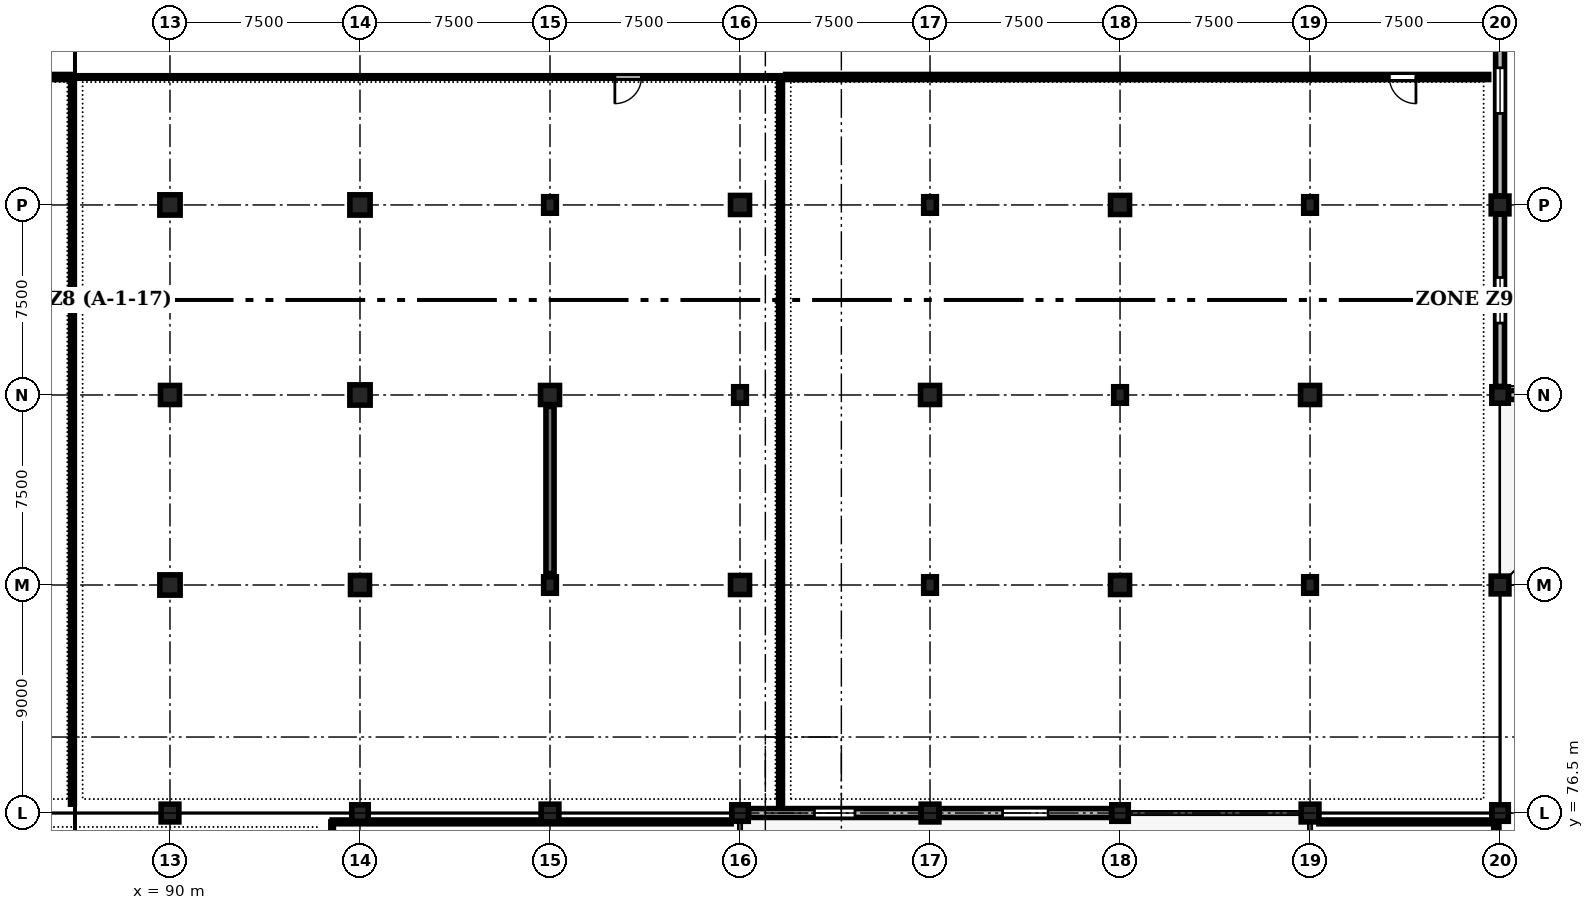
"""IFC4 building model, lengths in metres.
Left out: names, types, materials, properties, quantities, classifications, styles, units other than length and angle.
Written with IfcOpenShell. Run it as: python <this file> out.ifc"""

import sys

from ifc_helpers import new_model, si_unit, direction, frame, frame_2d, origin, origin_2d, place, context, subcontext, project, spatial, rectangle, circle, extrude, element, fill, save


model = new_model("IFC4")
c1 = context("Model", 3, precision=1e-05, world=origin(), true_north=direction((0.0, 1.0)))
c2 = subcontext(c1, "Body", "Model", "MODEL_VIEW")
j1 = project(units=[si_unit("LENGTHUNIT", "METRE"), si_unit("PLANEANGLEUNIT", "RADIAN")], contexts=[c1])
p1 = place(None, origin())
s1 = spatial("IfcSite", under=j1, at=p1, CompositionType="ELEMENT")
p2 = place(p1, origin())
s2 = spatial("IfcBuilding", under=s1, at=p2, CompositionType="ELEMENT")
p3 = place(p2, origin())
s3 = spatial("IfcBuildingStorey", under=s2, at=p3, CompositionType="ELEMENT", Elevation=0.0)
p4 = place(p3, frame((90.0, 76.5, 0.0), z_axis=(0.0, 0.0, 1.0), x_axis=(1.0, 0.0, 0.0)))
e1 = element("IfcColumn", 1, at=p4, inside=s3, PredefinedType="COLUMN", context=c2, shape_type="SweptSolid", body=[
    extrude(rectangle(XDim=0.7, YDim=0.7, at=origin_2d()), origin(), (0.0, 0.0, 1.0), 4.8),
])
p5 = place(p3, frame((90.0, 85.5, 0.0), z_axis=(0.0, 0.0, 1.0), x_axis=(1.0, 0.0, 0.0)))
e2 = element("IfcColumn", 2, at=p5, inside=s3, PredefinedType="COLUMN", context=c2, shape_type="SweptSolid", body=[
    extrude(rectangle(XDim=0.8, YDim=0.8, at=origin_2d()), origin(), (0.0, 0.0, 1.0), 4.8),
])
p6 = place(p3, frame((90.0, 93.0, 0.0), z_axis=(0.0, 0.0, 1.0), x_axis=(1.0, 0.0, 0.0)))
e3 = element("IfcColumn", 3, at=p6, inside=s3, PredefinedType="COLUMN", context=c2, shape_type="SweptSolid", body=[
    extrude(circle(Radius=0.375, at=origin_2d()), origin(), (0.0, 0.0, 1.0), 4.8),
])
p7 = place(p3, frame((90.0, 100.5, 0.0), z_axis=(0.0, 0.0, 1.0), x_axis=(1.0, 0.0, 0.0)))
e4 = element("IfcColumn", 4, at=p7, inside=s3, PredefinedType="COLUMN", context=c2, shape_type="SweptSolid", body=[
    extrude(rectangle(XDim=0.8, YDim=0.8, at=origin_2d()), origin(), (0.0, 0.0, 1.0), 4.8),
])
p8 = place(p3, frame((97.5, 76.5, 0.0), z_axis=(0.0, 0.0, 1.0), x_axis=(1.0, 0.0, 0.0)))
e5 = element("IfcColumn", 5, at=p8, inside=s3, PredefinedType="COLUMN", context=c2, shape_type="SweptSolid", body=[
    extrude(rectangle(XDim=0.65, YDim=0.65, at=origin_2d()), origin(), (0.0, 0.0, 1.0), 4.8),
])
p9 = place(p3, frame((97.5, 85.5, 0.0), z_axis=(0.0, 0.0, 1.0), x_axis=(1.0, 0.0, 0.0)))
e6 = element("IfcColumn", 6, at=p9, inside=s3, PredefinedType="COLUMN", context=c2, shape_type="SweptSolid", body=[
    extrude(circle(Radius=0.375, at=origin_2d()), origin(), (0.0, 0.0, 1.0), 4.8),
])
for number, where, z_axis, x_axis in (
    (7, (97.5, 93.0, 0.0), (0.0, 0.0, 1.0), (1.0, 0.0, 0.0)),
    (8, (97.5, 100.5, 0.0), (0.0, 0.0, 1.0), (1.0, 0.0, 0.0)),
):
    element("IfcColumn", number, at=place(p3, frame(where, z_axis=z_axis, x_axis=x_axis)), inside=s3, PredefinedType="COLUMN", context=c2, shape_type="SweptSolid", body=[
        extrude(rectangle(XDim=0.8, YDim=0.8, at=origin_2d()), origin(), (0.0, 0.0, 1.0), 4.8),
    ])
p10 = place(p3, frame((105.0, 76.5, 0.0), z_axis=(0.0, 0.0, 1.0), x_axis=(1.0, 0.0, 0.0)))
e9 = element("IfcColumn", 9, at=p10, inside=s3, PredefinedType="COLUMN", context=c2, shape_type="SweptSolid", body=[
    extrude(rectangle(XDim=0.7, YDim=0.7, at=origin_2d()), origin(), (0.0, 0.0, 1.0), 4.8),
])
p11 = place(p3, frame((105.0, 85.5, 0.0), z_axis=(0.0, 0.0, 1.0), x_axis=(1.0, 0.0, 0.0)))
e10 = element("IfcColumn", 10, at=p11, inside=s3, PredefinedType="COLUMN", context=c2, shape_type="SweptSolid", body=[
    extrude(rectangle(XDim=0.5, YDim=0.65, at=origin_2d()), origin(), (0.0, 0.0, 1.0), 4.8),
])
p12 = place(p3, frame((105.0, 93.0, 0.0), z_axis=(0.0, 0.0, 1.0), x_axis=(1.0, 0.0, 0.0)))
e11 = element("IfcColumn", 11, at=p12, inside=s3, PredefinedType="COLUMN", context=c2, shape_type="SweptSolid", body=[
    extrude(rectangle(XDim=0.75, YDim=0.75, at=origin_2d()), origin(), (0.0, 0.0, 1.0), 4.8),
])
p13 = place(p3, frame((105.0, 100.5, 0.0), z_axis=(0.0, 0.0, 1.0), x_axis=(1.0, 0.0, 0.0)))
e12 = element("IfcColumn", 12, at=p13, inside=s3, PredefinedType="COLUMN", context=c2, shape_type="SweptSolid", body=[
    extrude(rectangle(XDim=0.5, YDim=0.65, at=origin_2d()), origin(), (0.0, 0.0, 1.0), 4.8),
])
p14 = place(p3, frame((112.5, 76.5, 0.0), z_axis=(0.0, 0.0, 1.0), x_axis=(1.0, 0.0, 0.0)))
e13 = element("IfcColumn", 13, at=p14, inside=s3, PredefinedType="COLUMN", context=c2, shape_type="SweptSolid", body=[
    extrude(rectangle(XDim=0.65, YDim=0.65, at=origin_2d()), origin(), (0.0, 0.0, 1.0), 4.8),
])
p15 = place(p3, frame((112.5, 85.5, 0.0), z_axis=(0.0, 0.0, 1.0), x_axis=(1.0, 0.0, 0.0)))
e14 = element("IfcColumn", 14, at=p15, inside=s3, PredefinedType="COLUMN", context=c2, shape_type="SweptSolid", body=[
    extrude(rectangle(XDim=0.75, YDim=0.75, at=origin_2d()), origin(), (0.0, 0.0, 1.0), 4.8),
])
p16 = place(p3, frame((112.5, 93.0, 0.0), z_axis=(0.0, 0.0, 1.0), x_axis=(1.0, 0.0, 0.0)))
e15 = element("IfcColumn", 15, at=p16, inside=s3, PredefinedType="COLUMN", context=c2, shape_type="SweptSolid", body=[
    extrude(rectangle(XDim=0.5, YDim=0.65, at=origin_2d()), origin(), (0.0, 0.0, 1.0), 4.8),
])
p17 = place(p3, frame((112.5, 100.5, 0.0), z_axis=(0.0, 0.0, 1.0), x_axis=(1.0, 0.0, 0.0)))
e16 = element("IfcColumn", 16, at=p17, inside=s3, PredefinedType="COLUMN", context=c2, shape_type="SweptSolid", body=[
    extrude(rectangle(XDim=0.75, YDim=0.75, at=origin_2d()), origin(), (0.0, 0.0, 1.0), 4.8),
])
p18 = place(p3, frame((120.0, 76.5, 0.0), z_axis=(0.0, 0.0, 1.0), x_axis=(1.0, 0.0, 0.0)))
e17 = element("IfcColumn", 17, at=p18, inside=s3, PredefinedType="COLUMN", context=c2, shape_type="SweptSolid", body=[
    extrude(rectangle(XDim=0.7, YDim=0.7, at=origin_2d()), origin(), (0.0, 0.0, 1.0), 4.8),
])
p19 = place(p3, frame((120.0, 85.5, 0.0), z_axis=(0.0, 0.0, 1.0), x_axis=(1.0, 0.0, 0.0)))
e18 = element("IfcColumn", 18, at=p19, inside=s3, PredefinedType="COLUMN", context=c2, shape_type="SweptSolid", body=[
    extrude(rectangle(XDim=0.5, YDim=0.65, at=origin_2d()), origin(), (0.0, 0.0, 1.0), 4.8),
])
p20 = place(p3, frame((120.0, 93.0, 0.0), z_axis=(0.0, 0.0, 1.0), x_axis=(1.0, 0.0, 0.0)))
e19 = element("IfcColumn", 19, at=p20, inside=s3, PredefinedType="COLUMN", context=c2, shape_type="SweptSolid", body=[
    extrude(rectangle(XDim=0.75, YDim=0.75, at=origin_2d()), origin(), (0.0, 0.0, 1.0), 4.8),
])
p21 = place(p3, frame((120.0, 100.5, 0.0), z_axis=(0.0, 0.0, 1.0), x_axis=(1.0, 0.0, 0.0)))
e20 = element("IfcColumn", 20, at=p21, inside=s3, PredefinedType="COLUMN", context=c2, shape_type="SweptSolid", body=[
    extrude(rectangle(XDim=0.5, YDim=0.65, at=origin_2d()), origin(), (0.0, 0.0, 1.0), 4.8),
])
p22 = place(p3, frame((127.5, 76.5, 0.0), z_axis=(0.0, 0.0, 1.0), x_axis=(1.0, 0.0, 0.0)))
e21 = element("IfcColumn", 21, at=p22, inside=s3, PredefinedType="COLUMN", context=c2, shape_type="SweptSolid", body=[
    extrude(rectangle(XDim=0.65, YDim=0.65, at=origin_2d()), origin(), (0.0, 0.0, 1.0), 4.8),
])
p23 = place(p3, frame((127.5, 85.5, 0.0), z_axis=(0.0, 0.0, 1.0), x_axis=(1.0, 0.0, 0.0)))
e22 = element("IfcColumn", 22, at=p23, inside=s3, PredefinedType="COLUMN", context=c2, shape_type="SweptSolid", body=[
    extrude(rectangle(XDim=0.75, YDim=0.75, at=origin_2d()), origin(), (0.0, 0.0, 1.0), 4.8),
])
p24 = place(p3, frame((127.5, 93.0, 0.0), z_axis=(0.0, 0.0, 1.0), x_axis=(1.0, 0.0, 0.0)))
e23 = element("IfcColumn", 23, at=p24, inside=s3, PredefinedType="COLUMN", context=c2, shape_type="SweptSolid", body=[
    extrude(rectangle(XDim=0.5, YDim=0.65, at=origin_2d()), origin(), (0.0, 0.0, 1.0), 4.8),
])
p25 = place(p3, frame((127.5, 100.5, 0.0), z_axis=(0.0, 0.0, 1.0), x_axis=(1.0, 0.0, 0.0)))
e24 = element("IfcColumn", 24, at=p25, inside=s3, PredefinedType="COLUMN", context=c2, shape_type="SweptSolid", body=[
    extrude(rectangle(XDim=0.75, YDim=0.75, at=origin_2d()), origin(), (0.0, 0.0, 1.0), 4.8),
])
p26 = place(p3, frame((135.0, 76.5, 0.0), z_axis=(0.0, 0.0, 1.0), x_axis=(1.0, 0.0, 0.0)))
e25 = element("IfcColumn", 25, at=p26, inside=s3, PredefinedType="COLUMN", context=c2, shape_type="SweptSolid", body=[
    extrude(rectangle(XDim=0.7, YDim=0.7, at=origin_2d()), origin(), (0.0, 0.0, 1.0), 4.8),
])
p27 = place(p3, frame((135.0, 85.5, 0.0), z_axis=(0.0, 0.0, 1.0), x_axis=(1.0, 0.0, 0.0)))
e26 = element("IfcColumn", 26, at=p27, inside=s3, PredefinedType="COLUMN", context=c2, shape_type="SweptSolid", body=[
    extrude(rectangle(XDim=0.5, YDim=0.65, at=origin_2d()), origin(), (0.0, 0.0, 1.0), 4.8),
])
p28 = place(p3, frame((135.0, 93.0, 0.0), z_axis=(0.0, 0.0, 1.0), x_axis=(1.0, 0.0, 0.0)))
e27 = element("IfcColumn", 27, at=p28, inside=s3, PredefinedType="COLUMN", context=c2, shape_type="SweptSolid", body=[
    extrude(rectangle(XDim=0.75, YDim=0.75, at=origin_2d()), origin(), (0.0, 0.0, 1.0), 4.8),
])
p29 = place(p3, frame((135.0, 100.5, 0.0), z_axis=(0.0, 0.0, 1.0), x_axis=(1.0, 0.0, 0.0)))
e28 = element("IfcColumn", 28, at=p29, inside=s3, PredefinedType="COLUMN", context=c2, shape_type="SweptSolid", body=[
    extrude(rectangle(XDim=0.5, YDim=0.65, at=origin_2d()), origin(), (0.0, 0.0, 1.0), 4.8),
])
p30 = place(p3, frame((142.5, 76.5, 0.0), z_axis=(0.0, 0.0, 1.0), x_axis=(1.0, 0.0, 0.0)))
e29 = element("IfcColumn", 29, at=p30, inside=s3, PredefinedType="COLUMN", context=c2, shape_type="SweptSolid", body=[
    extrude(rectangle(XDim=0.65, YDim=0.65, at=origin_2d()), origin(), (0.0, 0.0, 1.0), 4.8),
])
p31 = place(p3, frame((142.5, 85.5, 0.0), z_axis=(0.0, 0.0, 1.0), x_axis=(1.0, 0.0, 0.0)))
e30 = element("IfcColumn", 30, at=p31, inside=s3, PredefinedType="COLUMN", context=c2, shape_type="SweptSolid", body=[
    extrude(rectangle(XDim=0.7, YDim=0.7, at=origin_2d()), origin(), (0.0, 0.0, 1.0), 4.8),
])
p32 = place(p3, frame((142.5, 93.0, 0.0), z_axis=(0.0, 0.0, 1.0), x_axis=(1.0, 0.0, 0.0)))
e31 = element("IfcColumn", 31, at=p32, inside=s3, PredefinedType="COLUMN", context=c2, shape_type="SweptSolid", body=[
    extrude(rectangle(XDim=0.65, YDim=0.65, at=origin_2d()), origin(), (0.0, 0.0, 1.0), 4.8),
])
p33 = place(p3, frame((142.5, 100.5, 0.0), z_axis=(0.0, 0.0, 1.0), x_axis=(1.0, 0.0, 0.0)))
e32 = element("IfcColumn", 32, at=p33, inside=s3, PredefinedType="COLUMN", context=c2, shape_type="SweptSolid", body=[
    extrude(rectangle(XDim=0.7, YDim=0.7, at=origin_2d()), origin(), (0.0, 0.0, 1.0), 4.8),
])
p34 = place(p3, frame((105.0, 85.95, 0.0), z_axis=(0.0, 0.0, 1.0), x_axis=(0.0, 1.0, 0.0)))
e33 = element("IfcWall", 33, at=p34, inside=s3, PredefinedType="SHEAR", context=c2, shape_type="SweptSolid", body=[
    extrude(rectangle(XDim=6.6, YDim=0.32, at=frame_2d((3.3, 0.0))), origin(), (0.0, 0.0, 1.0), 3.95),
])
p35 = place(p3, frame((119.64, 76.5, 0.0), z_axis=(0.0, 0.0, 1.0), x_axis=(-1.0, 0.0, 0.0)))
e34 = element("IfcWall", 34, at=p35, inside=s3, PredefinedType="STANDARD", context=c2, shape_type="SweptSolid", body=[
    extrude(rectangle(XDim=6.805, YDim=0.35, at=frame_2d((3.402, 0.0))), origin(), (0.0, 0.0, 1.0), 3.95),
])
p36 = place(p35, frame((2.603, 0.0, 0.9)))
e35 = element("IfcOpeningElement", 35, at=p36, cuts=e34, PredefinedType="OPENING", context=c2, shape_type="SweptSolid", body=[
    extrude(rectangle(XDim=1.6, YDim=1.95, at=frame_2d((0.8, 0.975))), frame((0.0, 0.185, 0.0), z_axis=(0.0, -1.0, 0.0), x_axis=(1.0, 0.0, 0.0)), (0.0, 0.0, 1.0), 0.37),
])
p37 = place(p3, frame((127.165, 76.5, 0.0), z_axis=(0.0, 0.0, 1.0), x_axis=(-1.0, 0.0, 0.0)))
e36 = element("IfcWall", 36, at=p37, inside=s3, PredefinedType="STANDARD", context=c2, shape_type="SweptSolid", body=[
    extrude(rectangle(XDim=6.805, YDim=0.35, at=frame_2d((3.402, 0.0))), origin(), (0.0, 0.0, 1.0), 3.95),
])
p38 = place(p37, frame((2.502, 0.0, 0.9)))
e37 = element("IfcOpeningElement", 37, at=p38, cuts=e36, PredefinedType="OPENING", context=c2, shape_type="SweptSolid", body=[
    extrude(rectangle(XDim=1.8, YDim=1.95, at=frame_2d((0.9, 0.975))), frame((0.0, 0.185, 0.0), z_axis=(0.0, -1.0, 0.0), x_axis=(1.0, 0.0, 0.0)), (0.0, 0.0, 1.0), 0.37),
])
p39 = place(p3, frame((142.5, 100.14, 0.0), z_axis=(0.0, 0.0, 1.0), x_axis=(0.0, -1.0, 0.0)))
e38 = element("IfcWall", 38, at=p39, inside=s3, PredefinedType="STANDARD", context=c2, shape_type="SweptSolid", body=[
    extrude(rectangle(XDim=6.805, YDim=0.35, at=frame_2d((3.402, 0.0))), origin(), (0.0, 0.0, 1.0), 3.9),
])
p40 = place(p39, frame((2.502, 0.0, 0.9)))
e39 = element("IfcOpeningElement", 39, at=p40, cuts=e38, PredefinedType="OPENING", context=c2, shape_type="SweptSolid", body=[
    extrude(rectangle(XDim=1.8, YDim=1.8, at=frame_2d((0.9, 0.9))), frame((0.0, 0.185, 0.0), z_axis=(0.0, -1.0, 0.0), x_axis=(1.0, 0.0, 0.0)), (0.0, 0.0, 1.0), 0.37),
])
p41 = place(p3, frame((142.5, 109.165, 0.0), z_axis=(0.0, 0.0, 1.0), x_axis=(0.0, -1.0, 0.0)))
e40 = element("IfcWall", 40, at=p41, inside=s3, PredefinedType="STANDARD", context=c2, shape_type="SweptSolid", body=[
    extrude(rectangle(XDim=8.305, YDim=0.35, at=frame_2d((4.152, 0.0))), origin(), (0.0, 0.0, 1.0), 3.95),
])
p42 = place(p41, frame((3.252, 0.0, 0.9)))
e41 = element("IfcOpeningElement", 41, at=p42, cuts=e40, PredefinedType="OPENING", context=c2, shape_type="SweptSolid", body=[
    extrude(rectangle(XDim=1.8, YDim=2.4, at=frame_2d((0.9, 1.2))), frame((0.0, 0.185, 0.0), z_axis=(0.0, -1.0, 0.0), x_axis=(1.0, 0.0, 0.0)), (0.0, 0.0, 1.0), 0.37),
])
p43 = place(p3, frame((142.835, 93.0, 0.0), z_axis=(0.0, 0.0, 1.0), x_axis=(1.0, 0.0, 0.0)))
e42 = element("IfcWall", 42, at=p43, inside=s3, PredefinedType="STANDARD", context=c2, shape_type="SweptSolid", body=[
    extrude(rectangle(XDim=6.93, YDim=0.35, at=frame_2d((3.465, 0.0))), origin(), (0.0, 0.0, 1.0), 4.5),
])
p44 = place(p43, frame((2.565, 0.0, 0.9)))
e43 = element("IfcOpeningElement", 43, at=p44, cuts=e42, PredefinedType="OPENING", context=c2, shape_type="SweptSolid", body=[
    extrude(rectangle(XDim=1.8, YDim=1.8, at=frame_2d((0.9, 0.9))), frame((0.0, 0.185, 0.0), z_axis=(0.0, -1.0, 0.0), x_axis=(1.0, 0.0, 0.0)), (0.0, 0.0, 1.0), 0.37),
])
p45 = place(p3, frame((96.4, 76.15, 0.0), z_axis=(0.0, 0.0, 1.0), x_axis=(0.0, -1.0, 0.0)))
e44 = element("IfcWall", 44, at=p45, inside=s3, PredefinedType="PARTITIONING", context=c2, shape_type="SweptSolid", body=[
    extrude(rectangle(XDim=14.65, YDim=0.1, at=frame_2d((7.325, 0.0))), origin(), (0.0, 0.0, 1.0), 4.485),
])
p46 = place(p45, frame((2.87, 0.0, 0.0)))
e45 = element("IfcOpeningElement", 45, at=p46, cuts=e44, PredefinedType="OPENING", context=c2, shape_type="SweptSolid", body=[
    extrude(rectangle(XDim=1.05, YDim=2.2, at=frame_2d((0.525, 1.1))), frame((0.0, 0.06, 0.0), z_axis=(0.0, -1.0, 0.0), x_axis=(1.0, 0.0, 0.0)), (0.0, 0.0, 1.0), 0.12),
])
p47 = place(p3, frame((142.3, 31.5, 0.0), z_axis=(0.0, 0.0, 1.0), x_axis=(0.0, 1.0, 0.0)))
e46 = element("IfcWall", 46, at=p47, inside=s3, PredefinedType="PARTITIONING", context=c2, shape_type="SweptSolid", body=[
    extrude(rectangle(XDim=44.65, YDim=0.1, at=frame_2d((22.325, 0.0))), origin(), (0.0, 0.0, 1.0), 3.935),
])
p48 = place(p47, frame((26.11, 0.0, 0.0)))
e47 = element("IfcOpeningElement", 47, at=p48, cuts=e46, PredefinedType="OPENING", context=c2, shape_type="SweptSolid", body=[
    extrude(rectangle(XDim=1.05, YDim=2.2, at=frame_2d((0.525, 1.1))), frame((0.0, 0.06, 0.0), z_axis=(0.0, -1.0, 0.0), x_axis=(1.0, 0.0, 0.0)), (0.0, 0.0, 1.0), 0.12),
])
p49 = place(p3, frame((86.15, 105.55, 0.0), z_axis=(0.0, 0.0, 1.0), x_axis=(-1.0, 0.0, 0.0)))
e48 = element("IfcWall", 48, at=p49, inside=s3, PredefinedType="STANDARD", context=c2, shape_type="SweptSolid", body=[
    extrude(rectangle(XDim=27.75, YDim=0.2, at=frame_2d((13.875, 0.0))), origin(), (0.0, 0.0, 1.0), 4.485),
])
p50 = place(p49, frame((21.21, 0.0, 0.0)))
e49 = element("IfcOpeningElement", 49, at=p50, cuts=e48, PredefinedType="OPENING", context=c2, shape_type="SweptSolid", body=[
    extrude(rectangle(XDim=1.05, YDim=2.2, at=frame_2d((0.525, 1.1))), frame((0.0, 0.11, 0.0), z_axis=(0.0, -1.0, 0.0), x_axis=(1.0, 0.0, 0.0)), (0.0, 0.0, 1.0), 0.22),
])
p51 = place(p3, frame((114.1, 105.55, 0.0), z_axis=(0.0, 0.0, 1.0), x_axis=(-1.0, 0.0, 0.0)))
e50 = element("IfcWall", 50, at=p51, inside=s3, PredefinedType="PARTITIONING", context=c2, shape_type="SweptSolid", body=[
    extrude(rectangle(XDim=27.75, YDim=0.1, at=frame_2d((13.875, 0.0))), origin(), (0.0, 0.0, 1.0), 4.485),
])
p52 = place(p51, frame((5.49, 0.0, 0.0)))
e51 = element("IfcOpeningElement", 51, at=p52, cuts=e50, PredefinedType="OPENING", context=c2, shape_type="SweptSolid", body=[
    extrude(rectangle(XDim=1.05, YDim=2.2, at=frame_2d((0.525, 1.1))), frame((0.0, 0.06, 0.0), z_axis=(0.0, -1.0, 0.0), x_axis=(1.0, 0.0, 0.0)), (0.0, 0.0, 1.0), 0.12),
])
p53 = place(p3, frame((142.05, 105.55, 0.0), z_axis=(0.0, 0.0, 1.0), x_axis=(-1.0, 0.0, 0.0)))
e52 = element("IfcWall", 52, at=p53, inside=s3, PredefinedType="STANDARD", context=c2, shape_type="SweptSolid", body=[
    extrude(rectangle(XDim=27.75, YDim=0.2, at=frame_2d((13.875, 0.0))), origin(), (0.0, 0.0, 1.0), 4.485),
])
p54 = place(p53, frame((2.87, 0.0, 0.0)))
e53 = element("IfcOpeningElement", 53, at=p54, cuts=e52, PredefinedType="OPENING", context=c2, shape_type="SweptSolid", body=[
    extrude(rectangle(XDim=1.05, YDim=2.2, at=frame_2d((0.525, 1.1))), frame((0.0, 0.11, 0.0), z_axis=(0.0, -1.0, 0.0), x_axis=(1.0, 0.0, 0.0)), (0.0, 0.0, 1.0), 0.22),
])
p55 = place(p3, frame((96.4, 76.15, 0.0), z_axis=(0.0, 0.0, 1.0), x_axis=(1.0, 0.0, 0.0)))
e54 = element("IfcWall", 54, at=p55, inside=s3, PredefinedType="PARTITIONING", context=c2, shape_type="SweptSolid", body=[
    extrude(rectangle(XDim=15.75, YDim=0.15, at=frame_2d((7.875, 0.0))), origin(), (0.0, 0.0, 1.0), 3.835),
])
p56 = place(p3, frame((135.35, 76.15, 0.0), z_axis=(0.0, 0.0, 1.0), x_axis=(1.0, 0.0, 0.0)))
e55 = element("IfcWall", 55, at=p56, inside=s3, PredefinedType="PARTITIONING", context=c2, shape_type="SweptSolid", body=[
    extrude(rectangle(XDim=6.95, YDim=0.15, at=frame_2d((3.475, 0.0))), origin(), (0.0, 0.0, 1.0), 3.835),
])
p57 = place(p3, frame((86.15, 76.85, 0.0), z_axis=(0.0, 0.0, 1.0), x_axis=(0.0, 1.0, 0.0)))
e56 = element("IfcWall", 56, at=p57, inside=s3, PredefinedType="PARTITIONING", context=c2, shape_type="SweptSolid", body=[
    extrude(rectangle(XDim=28.7, YDim=0.15, at=frame_2d((14.35, 0.0))), origin(), (0.0, 0.0, 1.0), 4.085),
])
p58 = place(p3, frame((114.1, 76.85, 0.0), z_axis=(0.0, 0.0, 1.0), x_axis=(0.0, 1.0, 0.0)))
e57 = element("IfcWall", 57, at=p58, inside=s3, PredefinedType="PARTITIONING", context=c2, shape_type="SweptSolid", body=[
    extrude(rectangle(XDim=28.7, YDim=0.15, at=frame_2d((14.35, 0.0))), origin(), (0.0, 0.0, 1.0), 4.485),
])
p59 = place(p36, origin())
e58 = element("IfcWindow", 58, at=p59, inside=s3, PartitioningType="SINGLE_PANEL", PredefinedType="WINDOW", context=c2, shape_type="SweptSolid", body=[
    extrude(rectangle(XDim=1.6, YDim=1.95, at=frame_2d((0.8, 0.975))), frame((0.0, 0.03, 0.0), z_axis=(0.0, -1.0, 0.0), x_axis=(1.0, 0.0, 0.0)), (0.0, 0.0, 1.0), 0.06),
])
fill(e35, e58)
p60 = place(p38, origin())
e59 = element("IfcWindow", 59, at=p60, inside=s3, PartitioningType="SINGLE_PANEL", PredefinedType="WINDOW", context=c2, shape_type="SweptSolid", body=[
    extrude(rectangle(XDim=1.8, YDim=1.95, at=frame_2d((0.9, 0.975))), frame((0.0, 0.03, 0.0), z_axis=(0.0, -1.0, 0.0), x_axis=(1.0, 0.0, 0.0)), (0.0, 0.0, 1.0), 0.06),
])
fill(e37, e59)
p61 = place(p40, origin())
e60 = element("IfcWindow", 60, at=p61, inside=s3, PartitioningType="SINGLE_PANEL", PredefinedType="WINDOW", context=c2, shape_type="SweptSolid", body=[
    extrude(rectangle(XDim=1.8, YDim=1.8, at=frame_2d((0.9, 0.9))), frame((0.0, 0.03, 0.0), z_axis=(0.0, -1.0, 0.0), x_axis=(1.0, 0.0, 0.0)), (0.0, 0.0, 1.0), 0.06),
])
fill(e39, e60)
p62 = place(p42, origin())
e61 = element("IfcWindow", 61, at=p62, inside=s3, PartitioningType="SINGLE_PANEL", PredefinedType="WINDOW", context=c2, shape_type="SweptSolid", body=[
    extrude(rectangle(XDim=1.8, YDim=2.4, at=frame_2d((0.9, 1.2))), frame((0.0, 0.03, 0.0), z_axis=(0.0, -1.0, 0.0), x_axis=(1.0, 0.0, 0.0)), (0.0, 0.0, 1.0), 0.06),
])
fill(e41, e61)
p63 = place(p52, origin())
e62 = element("IfcDoor", 62, at=p63, inside=s3, OperationType="SINGLE_SWING_RIGHT", PredefinedType="DOOR", context=c2, shape_type="SweptSolid", body=[
    extrude(rectangle(XDim=1.05, YDim=2.2, at=frame_2d((0.525, 1.1))), frame((0.0, 0.025, 0.0), z_axis=(0.0, -1.0, 0.0), x_axis=(1.0, 0.0, 0.0)), (0.0, 0.0, 1.0), 0.05),
])
fill(e51, e62)
p64 = place(p54, origin())
e63 = element("IfcDoor", 63, at=p64, inside=s3, OperationType="SINGLE_SWING_LEFT", PredefinedType="DOOR", context=c2, shape_type="SweptSolid", body=[
    extrude(rectangle(XDim=1.05, YDim=2.2, at=frame_2d((0.525, 1.1))), frame((0.0, 0.025, 0.0), z_axis=(0.0, -1.0, 0.0), x_axis=(1.0, 0.0, 0.0)), (0.0, 0.0, 1.0), 0.05),
])
fill(e53, e63)
save(model, sys.argv[1])
